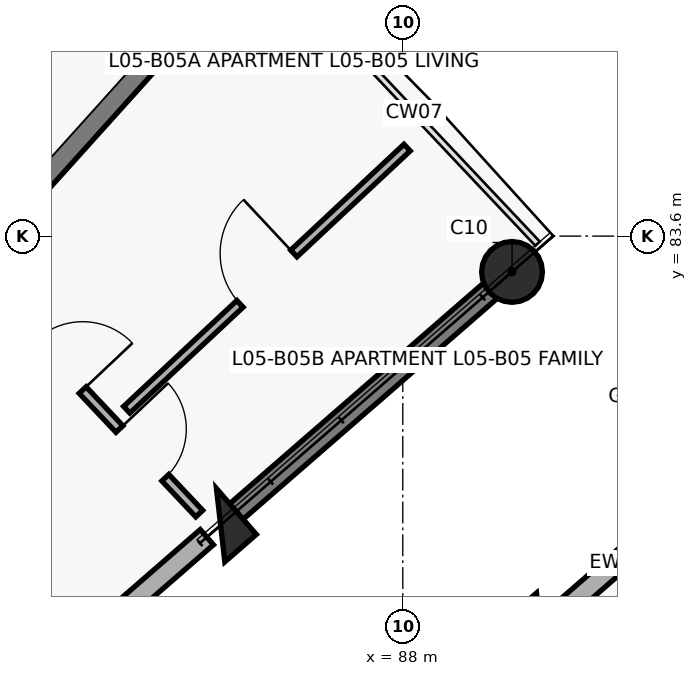
"""IFC4 building model, lengths in metres.
Left out: names, types, materials, properties, quantities, classifications, styles, units other than length and angle.
Written with IfcOpenShell. Run it as: python <this file> out.ifc"""

import sys

from ifc_helpers import new_model, si_unit, direction, frame, frame_2d, origin, origin_2d, place, context, subcontext, project, spatial, rectangle, circle, extrude, element, fill, save


model = new_model("IFC4")
c1 = context("Model", 3, precision=1e-05, world=origin(), true_north=direction((0.0, 1.0)))
c2 = subcontext(c1, "Body", "Model", "MODEL_VIEW")
j1 = project(units=[si_unit("LENGTHUNIT", "METRE"), si_unit("PLANEANGLEUNIT", "RADIAN")], contexts=[c1])
p1 = place(None, origin())
s1 = spatial("IfcSite", under=j1, at=p1, CompositionType="ELEMENT")
p2 = place(p1, origin())
s2 = spatial("IfcBuilding", under=s1, at=p2, CompositionType="ELEMENT")
p3 = place(p2, frame((0.0, 0.0, 17.4)))
s3 = spatial("IfcBuildingStorey", under=s2, at=p3, CompositionType="ELEMENT", Elevation=17.4)
p4 = place(p3, frame((85.603, 79.796, 0.0), z_axis=(0.0, 0.0, 1.0), x_axis=(0.754709580223, 0.656059028991, 0.0)))
e1 = element("IfcColumn", 1, at=p4, inside=s3, PredefinedType="COLUMN", context=c2, shape_type="SweptSolid", body=[
    extrude(rectangle(XDim=0.55, YDim=0.8, at=origin_2d()), origin(), (0.0, 0.0, 1.0), 3.1),
])
p5 = place(p3, frame((89.437, 83.129, 0.0), z_axis=(0.0, 0.0, 1.0), x_axis=(0.754709580223, 0.656059028991, 0.0)))
e2 = element("IfcColumn", 2, at=p5, inside=s3, PredefinedType="COLUMN", context=c2, shape_type="SweptSolid", body=[
    extrude(circle(Radius=0.4, at=origin_2d()), origin(), (0.0, 0.0, 1.0), 3.1),
])
p6 = place(p3, frame((85.739, 79.914, 0.0), z_axis=(0.0, 0.0, 1.0), x_axis=(0.754703505217, 0.65606601742, 0.0)))
e3 = element("IfcWall", 3, at=p6, inside=s3, PredefinedType="SHEAR", context=c2, shape_type="SweptSolid", body=[
    extrude(rectangle(XDim=4.72, YDim=0.27, at=frame_2d((2.36, 0.0))), origin(), (0.0, 0.0, 1.0), 2.86),
])
p7 = place(p3, frame((89.814, 78.422, 0.0), z_axis=(0.0, 0.0, 1.0), x_axis=(-0.754709580223, -0.656059028991, 0.0)))
e4 = element("IfcColumn", 4, at=p7, inside=s3, PredefinedType="COLUMN", context=c2, shape_type="SweptSolid", body=[
    extrude(rectangle(XDim=0.55, YDim=0.8, at=origin_2d()), origin(), (0.0, 0.0, 1.0), 3.1),
])
p8 = place(p3, frame((79.234, 74.259, 0.0), z_axis=(0.0, 0.0, 1.0), x_axis=(0.754717680958, 0.656049710044, 0.0)))
e5 = element("IfcWall", 5, at=p8, inside=s3, PredefinedType="SOLIDWALL", context=c2, shape_type="SweptSolid", body=[
    extrude(rectangle(XDim=8.2, YDim=0.265, at=frame_2d((4.1, 0.0))), origin(), (0.0, 0.0, 1.0), 2.18),
])
p9 = place(p8, frame((3.59, 0.0, 0.75)))
e6 = element("IfcOpeningElement", 6, at=p9, cuts=e5, PredefinedType="OPENING", context=c2, shape_type="SweptSolid", body=[
    extrude(rectangle(XDim=1.35, YDim=1.35, at=frame_2d((0.675, 0.675))), frame((0.0, 0.142, 0.0), z_axis=(0.0, -1.0, 0.0), x_axis=(1.0, 0.0, 0.0)), (0.0, 0.0, 1.0), 0.285),
])
p10 = place(p3, frame((91.746, 80.101, 0.0), z_axis=(0.0, 0.0, 1.0), x_axis=(-0.754704866158, -0.656064451862, 0.0)))
e7 = element("IfcWall", 7, at=p10, inside=s3, PredefinedType="SOLIDWALL", context=c2, shape_type="SweptSolid", body=[
    extrude(rectangle(XDim=8.2, YDim=0.265, at=frame_2d((4.1, 0.0))), origin(), (0.0, 0.0, 1.0), 2.18),
])
p11 = place(p10, frame((3.59, 0.0, 0.75)))
e8 = element("IfcOpeningElement", 8, at=p11, cuts=e7, PredefinedType="OPENING", context=c2, shape_type="SweptSolid", body=[
    extrude(rectangle(XDim=1.35, YDim=1.35, at=frame_2d((0.675, 0.675))), frame((0.0, 0.142, 0.0), z_axis=(0.0, -1.0, 0.0), x_axis=(1.0, 0.0, 0.0)), (0.0, 0.0, 1.0), 0.285),
])
p12 = place(p3, frame((80.309, 81.073, 0.0), z_axis=(0.0, 0.0, 1.0), x_axis=(0.668885797871, 0.743365179038, 0.0)))
e9 = element("IfcWall", 9, at=p12, inside=s3, PredefinedType="SHEAR", context=c2, shape_type="SweptSolid", body=[
    extrude(rectangle(XDim=7.69, YDim=0.3, at=frame_2d((3.845, 0.0))), origin(), (0.0, 0.0, 1.0), 3.1),
])
p13 = place(p3, frame((82.724, 82.701, 0.0), z_axis=(0.0, 0.0, 1.0), x_axis=(0.686331812627, -0.72728855551, 0.0)))
e10 = element("IfcWall", 10, at=p13, inside=s3, PredefinedType="PARTITIONING", context=c2, shape_type="SweptSolid", body=[
    extrude(rectangle(XDim=3.785, YDim=0.125, at=frame_2d((1.893, 0.0))), origin(), (0.0, 0.0, 1.0), 2.08),
])
p14 = place(p13, frame((0.65, 0.0, 0.0)))
e11 = element("IfcOpeningElement", 11, at=p14, cuts=e10, PredefinedType="OPENING", context=c2, shape_type="SweptSolid", body=[
    extrude(rectangle(XDim=0.9, YDim=2.1, at=frame_2d((0.45, 1.05))), frame((0.0, 0.073, 0.0), z_axis=(0.0, -1.0, 0.0), x_axis=(1.0, 0.0, 0.0)), (0.0, 0.0, 1.0), 0.145),
])
p15 = place(p13, frame((2.255, 0.0, 0.0)))
e12 = element("IfcOpeningElement", 12, at=p15, cuts=e10, PredefinedType="OPENING", context=c2, shape_type="SweptSolid", body=[
    extrude(rectangle(XDim=0.88, YDim=2.1, at=frame_2d((0.44, 1.05))), frame((0.0, 0.073, 0.0), z_axis=(0.0, -1.0, 0.0), x_axis=(1.0, 0.0, 0.0)), (0.0, 0.0, 1.0), 0.145),
])
p16 = place(p3, frame((84.368, 81.315, 0.0), z_axis=(0.0, 0.0, 1.0), x_axis=(0.73037487973, 0.683046510173, 0.0)))
e13 = element("IfcWall", 13, at=p16, inside=s3, PredefinedType="PARTITIONING", context=c2, shape_type="SweptSolid", body=[
    extrude(rectangle(XDim=5.05, YDim=0.12, at=frame_2d((2.525, 0.0))), origin(), (0.0, 0.0, 1.0), 2.08),
])
p17 = place(p16, frame((2.04, 0.0, 0.0)))
e14 = element("IfcOpeningElement", 14, at=p17, cuts=e13, PredefinedType="OPENING", context=c2, shape_type="SweptSolid", body=[
    extrude(rectangle(XDim=0.97, YDim=2.1, at=frame_2d((0.485, 1.05))), frame((0.0, 0.07, 0.0), z_axis=(0.0, -1.0, 0.0), x_axis=(1.0, 0.0, 0.0)), (0.0, 0.0, 1.0), 0.14),
])
p18 = place(p14, origin())
e15 = element("IfcDoor", 15, at=p18, inside=s3, OperationType="SINGLE_SWING_RIGHT", PredefinedType="DOOR", context=c2, shape_type="SweptSolid", body=[
    extrude(rectangle(XDim=0.9, YDim=2.1, at=frame_2d((0.45, 1.05))), frame((0.0, 0.025, 0.0), z_axis=(0.0, -1.0, 0.0), x_axis=(1.0, 0.0, 0.0)), (0.0, 0.0, 1.0), 0.05),
])
fill(e11, e15)
p19 = place(p15, origin())
e16 = element("IfcDoor", 16, at=p19, inside=s3, OperationType="SINGLE_SWING_LEFT", PredefinedType="DOOR", context=c2, shape_type="SweptSolid", body=[
    extrude(rectangle(XDim=0.88, YDim=2.1, at=frame_2d((0.44, 1.05))), frame((0.0, 0.025, 0.0), z_axis=(0.0, -1.0, 0.0), x_axis=(1.0, 0.0, 0.0)), (0.0, 0.0, 1.0), 0.05),
])
fill(e12, e16)
p20 = place(p17, origin())
e17 = element("IfcDoor", 17, at=p20, inside=s3, OperationType="SINGLE_SWING_RIGHT", PredefinedType="DOOR", context=c2, shape_type="SweptSolid", body=[
    extrude(rectangle(XDim=0.97, YDim=2.1, at=frame_2d((0.485, 1.05))), frame((0.0, 0.025, 0.0), z_axis=(0.0, -1.0, 0.0), x_axis=(1.0, 0.0, 0.0)), (0.0, 0.0, 1.0), 0.05),
])
fill(e14, e17)
save(model, sys.argv[1])
